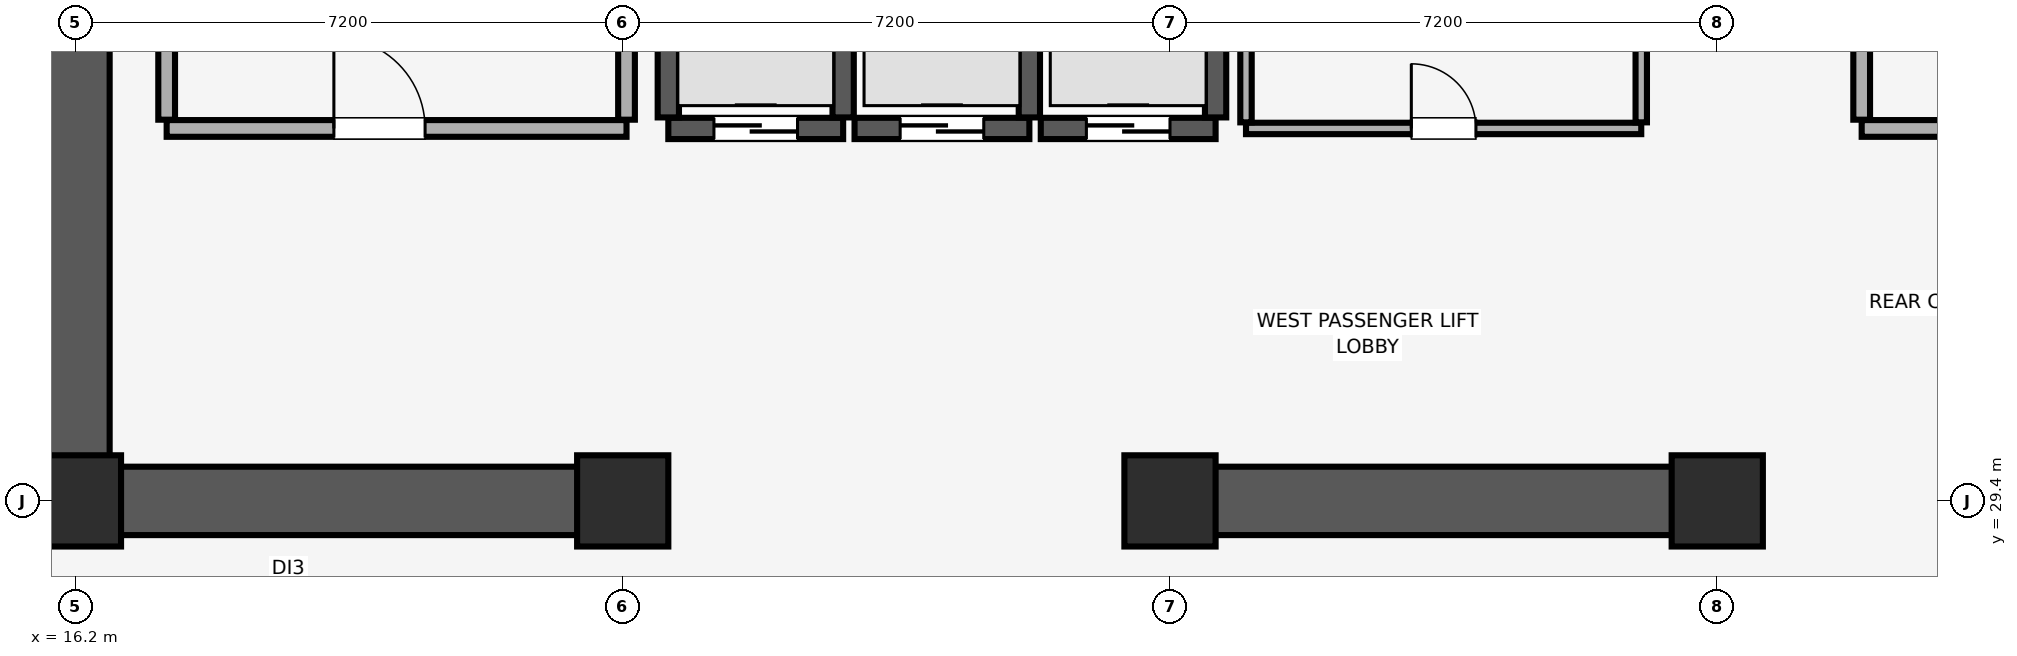
"""IFC4 building model, lengths in metres.
Left out: names, types, materials, properties, quantities, classifications, styles, units other than length and angle.
Written with IfcOpenShell. Run it as: python <this file> out.ifc"""

import sys

from ifc_helpers import new_model, si_unit, direction, frame, frame_2d, origin, origin_2d, place, context, subcontext, project, spatial, rectangle, extrude, element, fill, save


model = new_model("IFC4")
c1 = context("Model", 3, precision=1e-05, world=origin(), true_north=direction((0.0, 1.0)))
c2 = subcontext(c1, "Body", "Model", "MODEL_VIEW")
j1 = project(units=[si_unit("LENGTHUNIT", "METRE"), si_unit("PLANEANGLEUNIT", "RADIAN")], contexts=[c1])
p1 = place(None, origin())
s1 = spatial("IfcSite", under=j1, at=p1, CompositionType="ELEMENT")
p2 = place(p1, origin())
s2 = spatial("IfcBuilding", under=s1, at=p2, CompositionType="ELEMENT")
p3 = place(p2, frame((0.0, 0.0, 224.35)))
s3 = spatial("IfcBuildingStorey", under=s2, at=p3, CompositionType="ELEMENT", Elevation=224.35)
for number, where, z_axis, x_axis in (
    (1, (16.2, 29.4, 0.0), (0.0, 0.0, 1.0), (1.0, 0.0, 0.0)),
    (2, (23.4, 29.4, 0.0), (0.0, 0.0, 1.0), (1.0, 0.0, 0.0)),
    (3, (30.6, 29.4, 0.0), (0.0, 0.0, 1.0), (1.0, 0.0, 0.0)),
    (4, (37.8, 29.4, 0.0), (0.0, 0.0, 1.0), (1.0, 0.0, 0.0)),
):
    element("IfcColumn", number, at=place(p3, frame(where, z_axis=z_axis, x_axis=x_axis)), inside=s3, PredefinedType="COLUMN", context=c2, shape_type="SweptSolid", body=[
        extrude(rectangle(XDim=1.2, YDim=1.2, at=origin_2d()), origin(), (0.0, 0.0, 1.0), 4.56),
    ])
p4 = place(p3, frame((16.2, 29.4, 0.0), z_axis=(0.0, 0.0, 1.0), x_axis=(0.0, 1.0, 0.0)))
e5 = element("IfcWall", 5, at=p4, inside=s3, PredefinedType="SHEAR", context=c2, shape_type="SweptSolid", body=[
    extrude(rectangle(XDim=19.2, YDim=0.9, at=frame_2d((9.6, 0.0))), origin(), (0.0, 0.0, 1.0), 4.52),
])
p5 = place(p3, frame((16.655, 29.4, 0.0), z_axis=(0.0, 0.0, 1.0), x_axis=(1.0, 0.0, 0.0)))
e6 = element("IfcWall", 6, at=p5, inside=s3, PredefinedType="SHEAR", context=c2, shape_type="SweptSolid", body=[
    extrude(rectangle(XDim=6.945, YDim=0.9, at=frame_2d((3.473, 0.0))), origin(), (0.0, 0.0, 1.0), 4.52),
])
p6 = place(p3, frame((30.4, 29.4, 0.0), z_axis=(0.0, 0.0, 1.0), x_axis=(1.0, 0.0, 0.0)))
e7 = element("IfcWall", 7, at=p6, inside=s3, PredefinedType="SHEAR", context=c2, shape_type="SweptSolid", body=[
    extrude(rectangle(XDim=7.6, YDim=0.9, at=frame_2d((3.8, 0.0))), origin(), (0.0, 0.0, 1.0), 4.52),
])
p7 = place(p3, frame((24.0, 34.3, 0.0), z_axis=(0.0, 0.0, 1.0), x_axis=(1.0, 0.0, 0.0)))
e8 = element("IfcWall", 8, at=p7, inside=s3, PredefinedType="SHEAR", context=c2, shape_type="SweptSolid", body=[
    extrude(rectangle(XDim=2.3, YDim=0.28, at=frame_2d((1.15, 0.0))), origin(), (0.0, 0.0, 1.0), 4.52),
])
p8 = place(p7, frame((0.6, 0.0, 0.0)))
e9 = element("IfcOpeningElement", 9, at=p8, cuts=e8, PredefinedType="OPENING", context=c2, shape_type="SweptSolid", body=[
    extrude(rectangle(XDim=1.1, YDim=2.2, at=frame_2d((0.55, 1.1))), frame((0.0, 0.15, 0.0), z_axis=(0.0, -1.0, 0.0), x_axis=(1.0, 0.0, 0.0)), (0.0, 0.0, 1.0), 0.3),
])
for number, where, z_axis, x_axis in (
    (10, (24.0, 34.445, 0.0), (0.0, 0.0, 1.0), (0.0, 1.0, 0.0)),
    (11, (26.3, 34.445, 0.0), (0.0, 0.0, 1.0), (0.0, 1.0, 0.0)),
):
    element("IfcWall", number, at=place(p3, frame(where, z_axis=z_axis, x_axis=x_axis)), inside=s3, PredefinedType="SHEAR", context=c2, shape_type="SweptSolid", body=[
        extrude(rectangle(XDim=2.01, YDim=0.28, at=frame_2d((1.005, 0.0))), origin(), (0.0, 0.0, 1.0), 4.52),
    ])
p9 = place(p3, frame((26.45, 34.3, 0.0), z_axis=(0.0, 0.0, 1.0), x_axis=(1.0, 0.0, 0.0)))
e12 = element("IfcWall", 12, at=p9, inside=s3, PredefinedType="SHEAR", context=c2, shape_type="SweptSolid", body=[
    extrude(rectangle(XDim=2.3, YDim=0.28, at=frame_2d((1.15, 0.0))), origin(), (0.0, 0.0, 1.0), 4.52),
])
p10 = place(p9, frame((0.6, 0.0, 0.0)))
e13 = element("IfcOpeningElement", 13, at=p10, cuts=e12, PredefinedType="OPENING", context=c2, shape_type="SweptSolid", body=[
    extrude(rectangle(XDim=1.1, YDim=2.2, at=frame_2d((0.55, 1.1))), frame((0.0, 0.15, 0.0), z_axis=(0.0, -1.0, 0.0), x_axis=(1.0, 0.0, 0.0)), (0.0, 0.0, 1.0), 0.3),
])
p11 = place(p3, frame((28.75, 34.445, 0.0), z_axis=(0.0, 0.0, 1.0), x_axis=(0.0, 1.0, 0.0)))
e14 = element("IfcWall", 14, at=p11, inside=s3, PredefinedType="SHEAR", context=c2, shape_type="SweptSolid", body=[
    extrude(rectangle(XDim=2.01, YDim=0.28, at=frame_2d((1.005, 0.0))), origin(), (0.0, 0.0, 1.0), 4.52),
])
p12 = place(p3, frame((28.9, 34.3, 0.0), z_axis=(0.0, 0.0, 1.0), x_axis=(1.0, 0.0, 0.0)))
e15 = element("IfcWall", 15, at=p12, inside=s3, PredefinedType="SHEAR", context=c2, shape_type="SweptSolid", body=[
    extrude(rectangle(XDim=2.3, YDim=0.28, at=frame_2d((1.15, 0.0))), origin(), (0.0, 0.0, 1.0), 4.52),
])
p13 = place(p12, frame((0.6, 0.0, 0.0)))
e16 = element("IfcOpeningElement", 16, at=p13, cuts=e15, PredefinedType="OPENING", context=c2, shape_type="SweptSolid", body=[
    extrude(rectangle(XDim=1.1, YDim=2.2, at=frame_2d((0.55, 1.1))), frame((0.0, 0.15, 0.0), z_axis=(0.0, -1.0, 0.0), x_axis=(1.0, 0.0, 0.0)), (0.0, 0.0, 1.0), 0.3),
])
p14 = place(p3, frame((31.2, 34.445, 0.0), z_axis=(0.0, 0.0, 1.0), x_axis=(0.0, 1.0, 0.0)))
e17 = element("IfcWall", 17, at=p14, inside=s3, PredefinedType="SHEAR", context=c2, shape_type="SweptSolid", body=[
    extrude(rectangle(XDim=2.01, YDim=0.28, at=frame_2d((1.005, 0.0))), origin(), (0.0, 0.0, 1.0), 4.52),
])
p15 = place(p3, frame((17.4, 34.3, 0.0), z_axis=(0.0, 0.0, 1.0), x_axis=(1.0, 0.0, 0.0)))
e18 = element("IfcWall", 18, at=p15, inside=s3, PredefinedType="PARTITIONING", context=c2, shape_type="SweptSolid", body=[
    extrude(rectangle(XDim=6.05, YDim=0.22, at=frame_2d((3.025, 0.0))), origin(), (0.0, 0.0, 1.0), 4.52),
])
p16 = place(p15, frame((2.2, 0.0, 0.0)))
e19 = element("IfcOpeningElement", 19, at=p16, cuts=e18, PredefinedType="OPENING", context=c2, shape_type="SweptSolid", body=[
    extrude(rectangle(XDim=1.2, YDim=2.15, at=frame_2d((0.6, 1.075))), frame((0.0, 0.12, 0.0), z_axis=(0.0, -1.0, 0.0), x_axis=(1.0, 0.0, 0.0)), (0.0, 0.0, 1.0), 0.24),
])
p17 = place(p3, frame((17.4, 34.415, 0.0), z_axis=(0.0, 0.0, 1.0), x_axis=(0.0, 1.0, 0.0)))
e20 = element("IfcWall", 20, at=p17, inside=s3, PredefinedType="PARTITIONING", context=c2, shape_type="SweptSolid", body=[
    extrude(rectangle(XDim=5.43, YDim=0.22, at=frame_2d((2.715, 0.0))), origin(), (0.0, 0.0, 1.0), 4.52),
])
p18 = place(p3, frame((23.45, 34.415, 0.0), z_axis=(0.0, 0.0, 1.0), x_axis=(0.0, 1.0, 0.0)))
e21 = element("IfcWall", 21, at=p18, inside=s3, PredefinedType="PARTITIONING", context=c2, shape_type="SweptSolid", body=[
    extrude(rectangle(XDim=5.64, YDim=0.22, at=frame_2d((2.82, 0.0))), origin(), (0.0, 0.0, 1.0), 4.52),
])
p19 = place(p3, frame((39.7, 34.3, 0.0), z_axis=(0.0, 0.0, 1.0), x_axis=(1.0, 0.0, 0.0)))
e22 = element("IfcWall", 22, at=p19, inside=s3, PredefinedType="PARTITIONING", context=c2, shape_type="SweptSolid", body=[
    extrude(rectangle(XDim=4.6, YDim=0.22, at=frame_2d((2.3, 0.0))), origin(), (0.0, 0.0, 1.0), 4.52),
])
p20 = place(p19, frame((1.7, 0.0, 0.0)))
e23 = element("IfcOpeningElement", 23, at=p20, cuts=e22, PredefinedType="OPENING", context=c2, shape_type="SweptSolid", body=[
    extrude(rectangle(XDim=1.2, YDim=2.15, at=frame_2d((0.6, 1.075))), frame((0.0, 0.12, 0.0), z_axis=(0.0, -1.0, 0.0), x_axis=(1.0, 0.0, 0.0)), (0.0, 0.0, 1.0), 0.24),
])
p21 = place(p3, frame((39.7, 34.415, 0.0), z_axis=(0.0, 0.0, 1.0), x_axis=(0.0, 1.0, 0.0)))
e24 = element("IfcWall", 24, at=p21, inside=s3, PredefinedType="PARTITIONING", context=c2, shape_type="SweptSolid", body=[
    extrude(rectangle(XDim=5.785, YDim=0.22, at=frame_2d((2.893, 0.0))), origin(), (0.0, 0.0, 1.0), 4.52),
])
p22 = place(p3, frame((31.6, 34.3, 0.0), z_axis=(0.0, 0.0, 1.0), x_axis=(1.0, 0.0, 0.0)))
e25 = element("IfcWall", 25, at=p22, inside=s3, PredefinedType="PARTITIONING", context=c2, shape_type="SweptSolid", body=[
    extrude(rectangle(XDim=5.2, YDim=0.15, at=frame_2d((2.6, 0.0))), origin(), (0.0, 0.0, 1.0), 4.52),
])
p23 = place(p22, frame((2.175, 0.0, 0.0)))
e26 = element("IfcOpeningElement", 26, at=p23, cuts=e25, PredefinedType="OPENING", context=c2, shape_type="SweptSolid", body=[
    extrude(rectangle(XDim=0.85, YDim=2.1, at=frame_2d((0.425, 1.05))), frame((0.0, 0.085, 0.0), z_axis=(0.0, -1.0, 0.0), x_axis=(1.0, 0.0, 0.0)), (0.0, 0.0, 1.0), 0.17),
])
for number, where, z_axis, x_axis in (
    (27, (31.6, 34.38, 0.0), (0.0, 0.0, 1.0), (0.0, 1.0, 0.0)),
    (28, (36.8, 34.38, 0.0), (0.0, 0.0, 1.0), (0.0, 1.0, 0.0)),
):
    element("IfcWall", number, at=place(p3, frame(where, z_axis=z_axis, x_axis=x_axis)), inside=s3, PredefinedType="PARTITIONING", context=c2, shape_type="SweptSolid", body=[
        extrude(rectangle(XDim=4.94, YDim=0.15, at=frame_2d((2.47, 0.0))), origin(), (0.0, 0.0, 1.0), 4.52),
    ])
p24 = place(p8, origin())
e29 = element("IfcDoor", 29, at=p24, inside=s3, OperationType="DOUBLE_DOOR_SLIDING", PredefinedType="DOOR", context=c2, shape_type="SweptSolid", body=[
    extrude(rectangle(XDim=1.1, YDim=2.2, at=frame_2d((0.55, 1.1))), frame((0.0, 0.025, 0.0), z_axis=(0.0, -1.0, 0.0), x_axis=(1.0, 0.0, 0.0)), (0.0, 0.0, 1.0), 0.05),
])
fill(e9, e29)
p25 = place(p10, origin())
e30 = element("IfcDoor", 30, at=p25, inside=s3, OperationType="DOUBLE_DOOR_SLIDING", PredefinedType="DOOR", context=c2, shape_type="SweptSolid", body=[
    extrude(rectangle(XDim=1.1, YDim=2.2, at=frame_2d((0.55, 1.1))), frame((0.0, 0.025, 0.0), z_axis=(0.0, -1.0, 0.0), x_axis=(1.0, 0.0, 0.0)), (0.0, 0.0, 1.0), 0.05),
])
fill(e13, e30)
p26 = place(p13, origin())
e31 = element("IfcDoor", 31, at=p26, inside=s3, OperationType="DOUBLE_DOOR_SLIDING", PredefinedType="DOOR", context=c2, shape_type="SweptSolid", body=[
    extrude(rectangle(XDim=1.1, YDim=2.2, at=frame_2d((0.55, 1.1))), frame((0.0, 0.025, 0.0), z_axis=(0.0, -1.0, 0.0), x_axis=(1.0, 0.0, 0.0)), (0.0, 0.0, 1.0), 0.05),
])
fill(e16, e31)
p27 = place(p16, origin())
e32 = element("IfcDoor", 32, at=p27, inside=s3, OperationType="SINGLE_SWING_LEFT", PredefinedType="DOOR", context=c2, shape_type="SweptSolid", body=[
    extrude(rectangle(XDim=1.2, YDim=2.15, at=frame_2d((0.6, 1.075))), frame((0.0, 0.025, 0.0), z_axis=(0.0, -1.0, 0.0), x_axis=(1.0, 0.0, 0.0)), (0.0, 0.0, 1.0), 0.05),
])
fill(e19, e32)
p28 = place(p23, origin())
e33 = element("IfcDoor", 33, at=p28, inside=s3, OperationType="SINGLE_SWING_LEFT", PredefinedType="DOOR", context=c2, shape_type="SweptSolid", body=[
    extrude(rectangle(XDim=0.85, YDim=2.1, at=frame_2d((0.425, 1.05))), frame((0.0, 0.025, 0.0), z_axis=(0.0, -1.0, 0.0), x_axis=(1.0, 0.0, 0.0)), (0.0, 0.0, 1.0), 0.05),
])
fill(e26, e33)
save(model, sys.argv[1])
